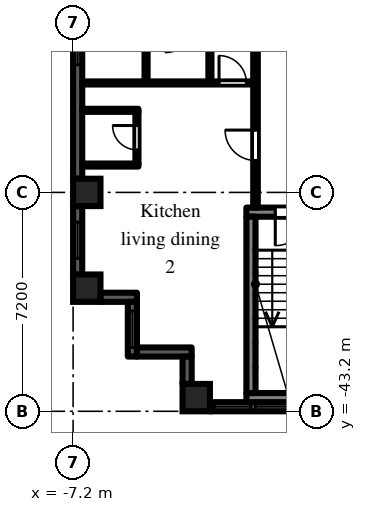
"""IFC4 building model, lengths in metres.
Left out: names, types, materials, properties, quantities, classifications, styles, units other than length and angle.
Written with IfcOpenShell. Run it as: python <this file> out.ifc"""

import sys

from ifc_helpers import new_model, si_unit, direction, frame, frame_2d, origin, origin_2d, place, context, subcontext, project, spatial, rectangle, extrude, element, fill, save


model = new_model("IFC4")
c1 = context("Model", 3, precision=1e-05, world=origin(), true_north=direction((0.0, 1.0)))
c2 = subcontext(c1, "Body", "Model", "MODEL_VIEW")
j1 = project(units=[si_unit("LENGTHUNIT", "METRE"), si_unit("PLANEANGLEUNIT", "RADIAN")], contexts=[c1])
p1 = place(None, origin())
s1 = spatial("IfcSite", under=j1, at=p1, CompositionType="ELEMENT")
p2 = place(p1, origin())
s2 = spatial("IfcBuilding", under=s1, at=p2, CompositionType="ELEMENT")
p3 = place(p2, frame((0.0, 0.0, 66.9)))
s3 = spatial("IfcBuildingStorey", under=s2, at=p3, CompositionType="ELEMENT", Elevation=66.9)
for number, where, z_axis, x_axis in (
    (1, (-6.75, -39.15, 0.0), (0.0, 0.0, 1.0), (1.0, 0.0, 0.0)),
    (2, (-6.75, -36.0, 0.0), (0.0, 0.0, 1.0), (1.0, 0.0, 0.0)),
    (3, (-3.15, -42.75, 0.0), (0.0, 0.0, 1.0), (1.0, 0.0, 0.0)),
):
    element("IfcColumn", number, at=place(p3, frame(where, z_axis=z_axis, x_axis=x_axis)), inside=s3, PredefinedType="COLUMN", context=c2, shape_type="SweptSolid", body=[
        extrude(rectangle(XDim=0.9, YDim=0.9, at=origin_2d()), origin(), (0.0, 0.0, 1.0), 3.0),
    ])
p4 = place(p3, frame((-7.05, -29.25, 0.0), z_axis=(0.0, 0.0, 1.0), x_axis=(0.0, -1.0, 0.0)))
e4 = element("IfcWall", 4, at=p4, inside=s3, PredefinedType="SOLIDWALL", context=c2, shape_type="SweptSolid", body=[
    extrude(rectangle(XDim=6.3, YDim=0.3, at=frame_2d((3.15, 0.0))), origin(), (0.0, 0.0, 1.0), 2.1),
])
p5 = place(p4, frame((0.15, 0.0, 0.2)))
e5 = element("IfcOpeningElement", 5, at=p5, cuts=e4, PredefinedType="OPENING", context=c2, shape_type="SweptSolid", body=[
    extrude(rectangle(XDim=2.4, YDim=1.85, at=frame_2d((1.2, 0.925))), frame((0.0, 0.16, 0.0), z_axis=(0.0, -1.0, 0.0), x_axis=(1.0, 0.0, 0.0)), (0.0, 0.0, 1.0), 0.32),
])
p6 = place(p3, frame((-7.05, -36.45, 0.0), z_axis=(0.0, 0.0, 1.0), x_axis=(0.0, -1.0, 0.0)))
e6 = element("IfcWall", 6, at=p6, inside=s3, PredefinedType="SOLIDWALL", context=c2, shape_type="SweptSolid", body=[
    extrude(rectangle(XDim=2.25, YDim=0.3, at=frame_2d((1.125, 0.0))), origin(), (0.0, 0.0, 1.0), 2.1),
])
p7 = place(p6, frame((0.525, 0.0, 0.2)))
e7 = element("IfcOpeningElement", 7, at=p7, cuts=e6, PredefinedType="OPENING", context=c2, shape_type="SweptSolid", body=[
    extrude(rectangle(XDim=1.2, YDim=1.85, at=frame_2d((0.6, 0.925))), frame((0.0, 0.16, 0.0), z_axis=(0.0, -1.0, 0.0), x_axis=(1.0, 0.0, 0.0)), (0.0, 0.0, 1.0), 0.32),
])
p8 = place(p3, frame((-6.3, -39.45, 0.0), z_axis=(0.0, 0.0, 1.0), x_axis=(1.0, 0.0, 0.0)))
e8 = element("IfcWall", 8, at=p8, inside=s3, PredefinedType="SOLIDWALL", context=c2, shape_type="SweptSolid", body=[
    extrude(rectangle(XDim=1.2, YDim=0.3, at=frame_2d((0.6, 0.0))), origin(), (0.0, 0.0, 1.0), 2.575),
])
p9 = place(p3, frame((-5.25, -39.6, 0.0), z_axis=(0.0, 0.0, 1.0), x_axis=(0.0, -1.0, 0.0)))
e9 = element("IfcWall", 9, at=p9, inside=s3, PredefinedType="SOLIDWALL", context=c2, shape_type="SweptSolid", body=[
    extrude(rectangle(XDim=1.8, YDim=0.3, at=frame_2d((0.9, 0.0))), origin(), (0.0, 0.0, 1.0), 2.575),
])
p10 = place(p9, frame((0.3, 0.0, 0.2)))
e10 = element("IfcOpeningElement", 10, at=p10, cuts=e9, PredefinedType="OPENING", context=c2, shape_type="SweptSolid", body=[
    extrude(rectangle(XDim=1.2, YDim=1.85, at=frame_2d((0.6, 0.925))), frame((0.0, 0.16, 0.0), z_axis=(0.0, -1.0, 0.0), x_axis=(1.0, 0.0, 0.0)), (0.0, 0.0, 1.0), 0.32),
])
p11 = place(p3, frame((-5.1, -41.25, 0.0), z_axis=(0.0, 0.0, 1.0), x_axis=(1.0, 0.0, 0.0)))
e11 = element("IfcWall", 11, at=p11, inside=s3, PredefinedType="SOLIDWALL", context=c2, shape_type="SweptSolid", body=[
    extrude(rectangle(XDim=1.8, YDim=0.3, at=frame_2d((0.9, 0.0))), origin(), (0.0, 0.0, 1.0), 2.575),
])
p12 = place(p3, frame((-3.45, -41.4, 0.0), z_axis=(0.0, 0.0, 1.0), x_axis=(0.0, -1.0, 0.0)))
e12 = element("IfcWall", 12, at=p12, inside=s3, PredefinedType="SOLIDWALL", context=c2, shape_type="SweptSolid", body=[
    extrude(rectangle(XDim=0.9, YDim=0.3, at=frame_2d((0.45, 0.0))), origin(), (0.0, 0.0, 1.0), 2.575),
])
p13 = place(p3, frame((-2.7, -43.05, 0.0), z_axis=(0.0, 0.0, 1.0), x_axis=(1.0, 0.0, 0.0)))
e13 = element("IfcWall", 13, at=p13, inside=s3, PredefinedType="SOLIDWALL", context=c2, shape_type="SweptSolid", body=[
    extrude(rectangle(XDim=5.4, YDim=0.3, at=frame_2d((2.7, 0.0))), origin(), (0.0, 0.0, 1.0), 2.1),
])
p14 = place(p13, frame((1.5, 0.0, 0.2)))
e14 = element("IfcOpeningElement", 14, at=p14, cuts=e13, PredefinedType="OPENING", context=c2, shape_type="SweptSolid", body=[
    extrude(rectangle(XDim=2.4, YDim=1.85, at=frame_2d((1.2, 0.925))), frame((0.0, 0.16, 0.0), z_axis=(0.0, -1.0, 0.0), x_axis=(1.0, 0.0, 0.0)), (0.0, 0.0, 1.0), 0.32),
])
p15 = place(p13, frame((0.15, 0.0, 0.2)))
e15 = element("IfcOpeningElement", 15, at=p15, cuts=e13, PredefinedType="OPENING", context=c2, shape_type="SweptSolid", body=[
    extrude(rectangle(XDim=1.2, YDim=1.85, at=frame_2d((0.6, 0.925))), frame((0.0, 0.16, 0.0), z_axis=(0.0, -1.0, 0.0), x_axis=(1.0, 0.0, 0.0)), (0.0, 0.0, 1.0), 0.32),
])
p16 = place(p13, frame((4.05, 0.0, 0.2)))
e16 = element("IfcOpeningElement", 16, at=p16, cuts=e13, PredefinedType="OPENING", context=c2, shape_type="SweptSolid", body=[
    extrude(rectangle(XDim=1.2, YDim=1.85, at=frame_2d((0.6, 0.925))), frame((0.0, 0.16, 0.0), z_axis=(0.0, -1.0, 0.0), x_axis=(1.0, 0.0, 0.0)), (0.0, 0.0, 1.0), 0.32),
])
p17 = place(p3, frame((-1.5, -36.65, 0.0), z_axis=(0.0, 0.0, 1.0), x_axis=(1.0, 0.0, 0.0)))
e17 = element("IfcWall", 17, at=p17, inside=s3, PredefinedType="SHEAR", context=c2, shape_type="SweptSolid", body=[
    extrude(rectangle(XDim=3.0, YDim=0.3, at=frame_2d((1.5, 0.0))), origin(), (0.0, 0.0, 1.0), 2.575),
])
p18 = place(p17, frame((0.95, 0.0, 0.0)))
e18 = element("IfcOpeningElement", 18, at=p18, cuts=e17, PredefinedType="OPENING", context=c2, shape_type="SweptSolid", body=[
    extrude(rectangle(XDim=1.1, YDim=2.1, at=frame_2d((0.55, 1.05))), frame((0.0, 0.16, 0.0), z_axis=(0.0, -1.0, 0.0), x_axis=(1.0, 0.0, 0.0)), (0.0, 0.0, 1.0), 0.32),
])
p19 = place(p3, frame((-1.5, -42.75, 0.0), z_axis=(0.0, 0.0, 1.0), x_axis=(1.0, 0.0, 0.0)))
e19 = element("IfcWall", 19, at=p19, inside=s3, PredefinedType="SHEAR", context=c2, shape_type="SweptSolid", body=[
    extrude(rectangle(XDim=3.0, YDim=0.3, at=frame_2d((1.5, 0.0))), origin(), (0.0, 0.0, 1.0), 2.575),
])
p20 = place(p3, frame((-1.35, -36.8, 0.0), z_axis=(0.0, 0.0, 1.0), x_axis=(0.0, -1.0, 0.0)))
e20 = element("IfcWall", 20, at=p20, inside=s3, PredefinedType="SHEAR", context=c2, shape_type="SweptSolid", body=[
    extrude(rectangle(XDim=5.8, YDim=0.3, at=frame_2d((2.9, 0.0))), origin(), (0.0, 0.0, 1.0), 2.575),
])
for number, where, z_axis, x_axis in (
    (21, (-6.9, -35.1, 0.0), (0.0, 0.0, 1.0), (1.0, 0.0, 0.0)),
    (22, (-6.9, -33.3, 0.0), (0.0, 0.0, 1.0), (1.0, 0.0, 0.0)),
):
    element("IfcWall", number, at=place(p3, frame(where, z_axis=z_axis, x_axis=x_axis)), inside=s3, PredefinedType="PARTITIONING", context=c2, shape_type="SweptSolid", body=[
        extrude(rectangle(XDim=1.85, YDim=0.1, at=frame_2d((0.925, 0.0))), origin(), (0.0, 0.0, 1.0), 2.575),
    ])
p21 = place(p3, frame((-6.9, -32.4, 0.0), z_axis=(0.0, 0.0, 1.0), x_axis=(1.0, 0.0, 0.0)))
e23 = element("IfcWall", 23, at=p21, inside=s3, PredefinedType="PARTITIONING", context=c2, shape_type="SweptSolid", body=[
    extrude(rectangle(XDim=5.625, YDim=0.1, at=frame_2d((2.812, 0.0))), origin(), (0.0, 0.0, 1.0), 2.575),
])
p22 = place(p21, frame((4.5, 0.0, 0.0)))
e24 = element("IfcOpeningElement", 24, at=p22, cuts=e23, PredefinedType="OPENING", context=c2, shape_type="SweptSolid", body=[
    extrude(rectangle(XDim=0.9, YDim=2.1, at=frame_2d((0.45, 1.05))), frame((0.0, 0.06, 0.0), z_axis=(0.0, -1.0, 0.0), x_axis=(1.0, 0.0, 0.0)), (0.0, 0.0, 1.0), 0.12),
])
p23 = place(p3, frame((-5.1, -35.05, 0.0), z_axis=(0.0, 0.0, 1.0), x_axis=(0.0, 1.0, 0.0)))
e25 = element("IfcWall", 25, at=p23, inside=s3, PredefinedType="PARTITIONING", context=c2, shape_type="SweptSolid", body=[
    extrude(rectangle(XDim=1.7, YDim=0.1, at=frame_2d((0.85, 0.0))), origin(), (0.0, 0.0, 1.0), 2.575),
])
p24 = place(p23, frame((0.45, 0.0, 0.0)))
e26 = element("IfcOpeningElement", 26, at=p24, cuts=e25, PredefinedType="OPENING", context=c2, shape_type="SweptSolid", body=[
    extrude(rectangle(XDim=0.8, YDim=2.1, at=frame_2d((0.4, 1.05))), frame((0.0, 0.06, 0.0), z_axis=(0.0, -1.0, 0.0), x_axis=(1.0, 0.0, 0.0)), (0.0, 0.0, 1.0), 0.12),
])
p25 = place(p3, frame((-4.8, -32.35, 0.0), z_axis=(0.0, 0.0, 1.0), x_axis=(0.0, 1.0, 0.0)))
e27 = element("IfcWall", 27, at=p25, inside=s3, PredefinedType="PARTITIONING", context=c2, shape_type="SweptSolid", body=[
    extrude(rectangle(XDim=1.8, YDim=0.1, at=frame_2d((0.9, 0.0))), origin(), (0.0, 0.0, 1.0), 2.575),
])
p26 = place(p3, frame((-2.7, -32.35, 0.0), z_axis=(0.0, 0.0, 1.0), x_axis=(0.0, 1.0, 0.0)))
e28 = element("IfcWall", 28, at=p26, inside=s3, PredefinedType="PARTITIONING", context=c2, shape_type="SweptSolid", body=[
    extrude(rectangle(XDim=17.888, YDim=0.1, at=frame_2d((8.944, 0.0))), origin(), (0.0, 0.0, 1.0), 2.575),
])
p27 = place(p26, frame((2.2, 0.0, 0.0)))
e29 = element("IfcOpeningElement", 29, at=p27, cuts=e28, PredefinedType="OPENING", context=c2, shape_type="SweptSolid", body=[
    extrude(rectangle(XDim=0.9, YDim=2.1, at=frame_2d((0.45, 1.05))), frame((0.0, 0.06, 0.0), z_axis=(0.0, -1.0, 0.0), x_axis=(1.0, 0.0, 0.0)), (0.0, 0.0, 1.0), 0.12),
])
p28 = place(p26, frame((4.0, 0.0, 0.0)))
e30 = element("IfcOpeningElement", 30, at=p28, cuts=e28, PredefinedType="OPENING", context=c2, shape_type="SweptSolid", body=[
    extrude(rectangle(XDim=0.9, YDim=2.1, at=frame_2d((0.45, 1.05))), frame((0.0, 0.06, 0.0), z_axis=(0.0, -1.0, 0.0), x_axis=(1.0, 0.0, 0.0)), (0.0, 0.0, 1.0), 0.12),
])
p29 = place(p26, frame((9.4, 0.0, 0.0)))
e31 = element("IfcOpeningElement", 31, at=p29, cuts=e28, PredefinedType="OPENING", context=c2, shape_type="SweptSolid", body=[
    extrude(rectangle(XDim=0.9, YDim=2.1, at=frame_2d((0.45, 1.05))), frame((0.0, 0.06, 0.0), z_axis=(0.0, -1.0, 0.0), x_axis=(1.0, 0.0, 0.0)), (0.0, 0.0, 1.0), 0.12),
])
p30 = place(p26, frame((11.2, 0.0, 0.0)))
e32 = element("IfcOpeningElement", 32, at=p30, cuts=e28, PredefinedType="OPENING", context=c2, shape_type="SweptSolid", body=[
    extrude(rectangle(XDim=0.9, YDim=2.1, at=frame_2d((0.45, 1.05))), frame((0.0, 0.06, 0.0), z_axis=(0.0, -1.0, 0.0), x_axis=(1.0, 0.0, 0.0)), (0.0, 0.0, 1.0), 0.12),
])
p31 = place(p26, frame((14.8, 0.0, 0.0)))
e33 = element("IfcOpeningElement", 33, at=p31, cuts=e28, PredefinedType="OPENING", context=c2, shape_type="SweptSolid", body=[
    extrude(rectangle(XDim=0.9, YDim=2.1, at=frame_2d((0.45, 1.05))), frame((0.0, 0.06, 0.0), z_axis=(0.0, -1.0, 0.0), x_axis=(1.0, 0.0, 0.0)), (0.0, 0.0, 1.0), 0.12),
])
p32 = place(p3, frame((-1.2, -36.5, 0.0), z_axis=(0.0, 0.0, 1.0), x_axis=(0.0, 1.0, 0.0)))
e34 = element("IfcWall", 34, at=p32, inside=s3, PredefinedType="PARTITIONING", context=c2, shape_type="SweptSolid", body=[
    extrude(rectangle(XDim=35.225, YDim=0.15, at=frame_2d((17.613, 0.0))), origin(), (0.0, 0.0, 1.0), 2.575),
])
p33 = place(p32, frame((31.85, 0.0, 0.0)))
e35 = element("IfcOpeningElement", 35, at=p33, cuts=e34, PredefinedType="OPENING", context=c2, shape_type="SweptSolid", body=[
    extrude(rectangle(XDim=0.9, YDim=2.1, at=frame_2d((0.45, 1.05))), frame((0.0, 0.085, 0.0), z_axis=(0.0, -1.0, 0.0), x_axis=(1.0, 0.0, 0.0)), (0.0, 0.0, 1.0), 0.17),
])
p34 = place(p32, frame((23.05, 0.0, 0.0)))
e36 = element("IfcOpeningElement", 36, at=p34, cuts=e34, PredefinedType="OPENING", context=c2, shape_type="SweptSolid", body=[
    extrude(rectangle(XDim=0.9, YDim=2.1, at=frame_2d((0.45, 1.05))), frame((0.0, 0.085, 0.0), z_axis=(0.0, -1.0, 0.0), x_axis=(1.0, 0.0, 0.0)), (0.0, 0.0, 1.0), 0.17),
])
p35 = place(p32, frame((26.65, 0.0, 0.0)))
e37 = element("IfcOpeningElement", 37, at=p35, cuts=e34, PredefinedType="OPENING", context=c2, shape_type="SweptSolid", body=[
    extrude(rectangle(XDim=0.9, YDim=2.1, at=frame_2d((0.45, 1.05))), frame((0.0, 0.085, 0.0), z_axis=(0.0, -1.0, 0.0), x_axis=(1.0, 0.0, 0.0)), (0.0, 0.0, 1.0), 0.17),
])
p36 = place(p32, frame((1.55, 0.0, 0.0)))
e38 = element("IfcOpeningElement", 38, at=p36, cuts=e34, PredefinedType="OPENING", context=c2, shape_type="SweptSolid", body=[
    extrude(rectangle(XDim=1.0, YDim=2.1, at=frame_2d((0.5, 1.05))), frame((0.0, 0.085, 0.0), z_axis=(0.0, -1.0, 0.0), x_axis=(1.0, 0.0, 0.0)), (0.0, 0.0, 1.0), 0.17),
])
p37 = place(p5, origin())
e39 = element("IfcWindow", 39, at=p37, inside=s3, PartitioningType="SINGLE_PANEL", PredefinedType="WINDOW", context=c2, shape_type="SweptSolid", body=[
    extrude(rectangle(XDim=2.4, YDim=1.85, at=frame_2d((1.2, 0.925))), frame((0.0, 0.03, 0.0), z_axis=(0.0, -1.0, 0.0), x_axis=(1.0, 0.0, 0.0)), (0.0, 0.0, 1.0), 0.06),
])
fill(e5, e39)
p38 = place(p7, origin())
e40 = element("IfcWindow", 40, at=p38, inside=s3, PartitioningType="SINGLE_PANEL", PredefinedType="WINDOW", context=c2, shape_type="SweptSolid", body=[
    extrude(rectangle(XDim=1.2, YDim=1.85, at=frame_2d((0.6, 0.925))), frame((0.0, 0.03, 0.0), z_axis=(0.0, -1.0, 0.0), x_axis=(1.0, 0.0, 0.0)), (0.0, 0.0, 1.0), 0.06),
])
fill(e7, e40)
p39 = place(p10, origin())
e41 = element("IfcWindow", 41, at=p39, inside=s3, PartitioningType="SINGLE_PANEL", PredefinedType="WINDOW", context=c2, shape_type="SweptSolid", body=[
    extrude(rectangle(XDim=1.2, YDim=1.85, at=frame_2d((0.6, 0.925))), frame((0.0, 0.03, 0.0), z_axis=(0.0, -1.0, 0.0), x_axis=(1.0, 0.0, 0.0)), (0.0, 0.0, 1.0), 0.06),
])
fill(e10, e41)
p40 = place(p14, origin())
e42 = element("IfcWindow", 42, at=p40, inside=s3, PartitioningType="SINGLE_PANEL", PredefinedType="WINDOW", context=c2, shape_type="SweptSolid", body=[
    extrude(rectangle(XDim=2.4, YDim=1.85, at=frame_2d((1.2, 0.925))), frame((0.0, 0.03, 0.0), z_axis=(0.0, -1.0, 0.0), x_axis=(1.0, 0.0, 0.0)), (0.0, 0.0, 1.0), 0.06),
])
fill(e14, e42)
p41 = place(p15, origin())
e43 = element("IfcWindow", 43, at=p41, inside=s3, PartitioningType="SINGLE_PANEL", PredefinedType="WINDOW", context=c2, shape_type="SweptSolid", body=[
    extrude(rectangle(XDim=1.2, YDim=1.85, at=frame_2d((0.6, 0.925))), frame((0.0, 0.03, 0.0), z_axis=(0.0, -1.0, 0.0), x_axis=(1.0, 0.0, 0.0)), (0.0, 0.0, 1.0), 0.06),
])
fill(e15, e43)
p42 = place(p18, frame((1.1, 0.0, 0.0), z_axis=(0.0, 0.0, 1.0), x_axis=(-1.0, 0.0, 0.0)))
e44 = element("IfcDoor", 44, at=p42, inside=s3, OperationType="SINGLE_SWING_RIGHT", PredefinedType="DOOR", context=c2, shape_type="SweptSolid", body=[
    extrude(rectangle(XDim=1.1, YDim=2.1, at=frame_2d((0.55, 1.05))), frame((0.0, 0.025, 0.0), z_axis=(0.0, -1.0, 0.0), x_axis=(1.0, 0.0, 0.0)), (0.0, 0.0, 1.0), 0.05),
])
fill(e18, e44)
p43 = place(p24, origin())
e45 = element("IfcDoor", 45, at=p43, inside=s3, OperationType="SINGLE_SWING_RIGHT", PredefinedType="DOOR", context=c2, shape_type="SweptSolid", body=[
    extrude(rectangle(XDim=0.8, YDim=2.1, at=frame_2d((0.4, 1.05))), frame((0.0, 0.025, 0.0), z_axis=(0.0, -1.0, 0.0), x_axis=(1.0, 0.0, 0.0)), (0.0, 0.0, 1.0), 0.05),
])
fill(e26, e45)
p44 = place(p36, origin())
e46 = element("IfcDoor", 46, at=p44, inside=s3, OperationType="SINGLE_SWING_RIGHT", PredefinedType="DOOR", context=c2, shape_type="SweptSolid", body=[
    extrude(rectangle(XDim=1.0, YDim=2.1, at=frame_2d((0.5, 1.05))), frame((0.0, 0.025, 0.0), z_axis=(0.0, -1.0, 0.0), x_axis=(1.0, 0.0, 0.0)), (0.0, 0.0, 1.0), 0.05),
])
fill(e38, e46)
p45 = place(p22, origin())
e47 = element("IfcDoor", 47, at=p45, inside=s3, OperationType="SINGLE_SWING_LEFT", PredefinedType="DOOR", context=c2, shape_type="SweptSolid", body=[
    extrude(rectangle(XDim=0.9, YDim=2.1, at=frame_2d((0.45, 1.05))), frame((0.0, 0.025, 0.0), z_axis=(0.0, -1.0, 0.0), x_axis=(1.0, 0.0, 0.0)), (0.0, 0.0, 1.0), 0.05),
])
fill(e24, e47)
save(model, sys.argv[1])
